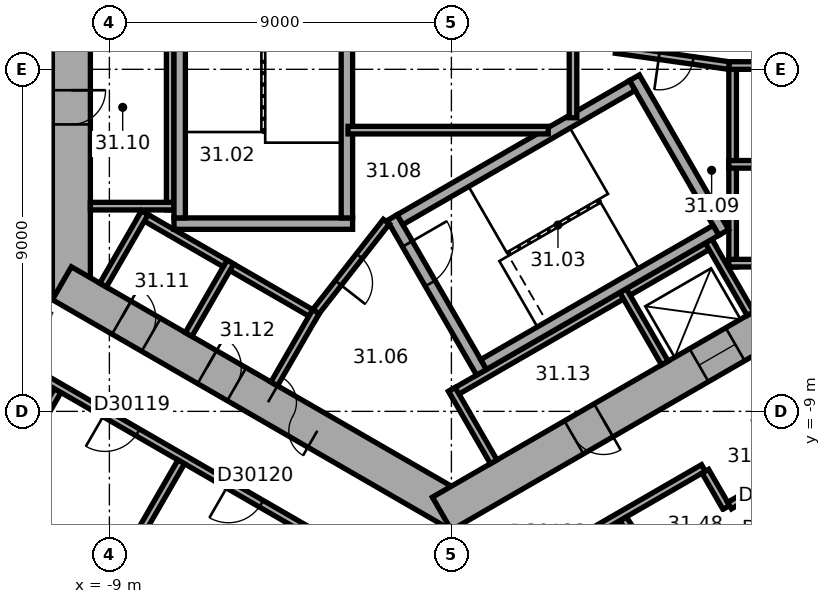
"""IFC4 building model, lengths in metres.
Left out: names, types, materials, properties, quantities, classifications, styles, units other than length and angle.
Written with IfcOpenShell. Run it as: python <this file> out.ifc"""

import sys

from ifc_helpers import new_model, si_unit, direction, frame, frame_2d, origin, place, context, subcontext, project, spatial, rectangle, extrude, element, fill, save


model = new_model("IFC4")
c1 = context("Model", 3, precision=1e-05, world=origin(), true_north=direction((0.0, 1.0)))
c2 = subcontext(c1, "Body", "Model", "MODEL_VIEW")
j1 = project(units=[si_unit("LENGTHUNIT", "METRE"), si_unit("PLANEANGLEUNIT", "RADIAN")], contexts=[c1])
p1 = place(None, origin())
s1 = spatial("IfcSite", under=j1, at=p1, CompositionType="ELEMENT")
p2 = place(p1, origin())
s2 = spatial("IfcBuilding", under=s1, at=p2, CompositionType="ELEMENT")
p3 = place(p2, frame((0.0, 0.0, 128.1)))
s3 = spatial("IfcBuildingStorey", under=s2, at=p3, CompositionType="ELEMENT", Elevation=128.1)
p4 = place(p3, frame((-10.0, 6.062, 0.0), z_axis=(0.0, 0.0, 1.0), x_axis=(0.0, -1.0, 0.0)))
e1 = element("IfcWall", 1, at=p4, inside=s3, PredefinedType="SHEAR", context=c2, shape_type="SweptSolid", body=[
    extrude(rectangle(XDim=12.125, YDim=1.0, at=frame_2d((6.062, 0.0))), origin(), (0.0, 0.0, 1.0), 3.7),
])
p5 = place(p4, frame((6.612, 0.0, 0.0)))
e2 = element("IfcOpeningElement", 2, at=p5, cuts=e1, PredefinedType="OPENING", context=c2, shape_type="SweptSolid", body=[
    extrude(rectangle(XDim=0.9, YDim=2.1, at=frame_2d((0.45, 1.05))), frame((0.0, 0.51, 0.0), z_axis=(0.0, -1.0, 0.0), x_axis=(1.0, 0.0, 0.0)), (0.0, 0.0, 1.0), 1.02),
])
p6 = place(p3, frame((-10.25, -5.629, 0.0), z_axis=(0.0, 0.0, 1.0), x_axis=(0.866022616891, -0.50000482701, 0.0)))
e3 = element("IfcWall", 3, at=p6, inside=s3, PredefinedType="SHEAR", context=c2, shape_type="SweptSolid", body=[
    extrude(rectangle(XDim=12.125, YDim=1.0, at=frame_2d((6.062, 0.0))), origin(), (0.0, 0.0, 1.0), 3.7),
])
p7 = place(p6, frame((6.262, 0.0, 0.0)))
e4 = element("IfcOpeningElement", 4, at=p7, cuts=e3, PredefinedType="OPENING", context=c2, shape_type="SweptSolid", body=[
    extrude(rectangle(XDim=1.5, YDim=2.1, at=frame_2d((0.75, 1.05))), frame((0.0, 0.51, 0.0), z_axis=(0.0, -1.0, 0.0), x_axis=(1.0, 0.0, 0.0)), (0.0, 0.0, 1.0), 1.02),
])
p8 = place(p6, frame((1.812, 0.0, 0.0)))
e5 = element("IfcOpeningElement", 5, at=p8, cuts=e3, PredefinedType="OPENING", context=c2, shape_type="SweptSolid", body=[
    extrude(rectangle(XDim=0.9, YDim=2.1, at=frame_2d((0.45, 1.05))), frame((0.0, 0.51, 0.0), z_axis=(0.0, -1.0, 0.0), x_axis=(1.0, 0.0, 0.0)), (0.0, 0.0, 1.0), 1.02),
])
p9 = place(p6, frame((4.412, 0.0, 0.0)))
e6 = element("IfcOpeningElement", 6, at=p9, cuts=e3, PredefinedType="OPENING", context=c2, shape_type="SweptSolid", body=[
    extrude(rectangle(XDim=0.9, YDim=2.1, at=frame_2d((0.45, 1.05))), frame((0.0, 0.51, 0.0), z_axis=(0.0, -1.0, 0.0), x_axis=(1.0, 0.0, 0.0)), (0.0, 0.0, 1.0), 1.02),
])
p10 = place(p3, frame((-0.25, -11.691, 0.0), z_axis=(0.0, 0.0, 1.0), x_axis=(0.866022616891, 0.50000482701, 0.0)))
e7 = element("IfcWall", 7, at=p10, inside=s3, PredefinedType="SHEAR", context=c2, shape_type="SweptSolid", body=[
    extrude(rectangle(XDim=12.125, YDim=1.0, at=frame_2d((6.062, 0.0))), origin(), (0.0, 0.0, 1.0), 3.7),
])
p11 = place(p10, frame((4.012, 0.0, 0.0)))
e8 = element("IfcOpeningElement", 8, at=p11, cuts=e7, PredefinedType="OPENING", context=c2, shape_type="SweptSolid", body=[
    extrude(rectangle(XDim=0.9, YDim=2.1, at=frame_2d((0.45, 1.05))), frame((0.0, 0.51, 0.0), z_axis=(0.0, -1.0, 0.0), x_axis=(1.0, 0.0, 0.0)), (0.0, 0.0, 1.0), 1.02),
])
p12 = place(p10, frame((7.812, 0.0, 0.0)))
e9 = element("IfcOpeningElement", 9, at=p12, cuts=e7, PredefinedType="OPENING", context=c2, shape_type="SweptSolid", body=[
    extrude(rectangle(XDim=1.1, YDim=2.1, at=frame_2d((0.55, 1.05))), frame((0.0, 0.51, 0.0), z_axis=(0.0, -1.0, 0.0), x_axis=(1.0, 0.0, 0.0)), (0.0, 0.0, 1.0), 1.02),
])
p13 = place(p3, frame((7.4, -5.2, 0.0), z_axis=(0.0, 0.0, 1.0), x_axis=(0.0, 1.0, 0.0)))
e10 = element("IfcWall", 10, at=p13, inside=s3, PredefinedType="PARTITIONING", context=c2, shape_type="SweptSolid", body=[
    extrude(rectangle(XDim=5.4, YDim=0.2, at=frame_2d((2.7, 0.0))), origin(), (0.0, 0.0, 1.0), 3.42),
])
for number, where, z_axis, x_axis in (
    (11, (7.3, -5.1, 0.0), (0.0, 0.0, 1.0), (1.0, 0.0, 0.0)),
    (12, (7.3, -2.5, 0.0), (0.0, 0.0, 1.0), (1.0, 0.0, 0.0)),
    (13, (7.3, 0.1, 0.0), (0.0, 0.0, 1.0), (1.0, 0.0, 0.0)),
):
    element("IfcWall", number, at=place(p3, frame(where, z_axis=z_axis, x_axis=x_axis)), inside=s3, PredefinedType="PARTITIONING", context=c2, shape_type="SweptSolid", body=[
        extrude(rectangle(XDim=2.2, YDim=0.2, at=frame_2d((1.1, 0.0))), origin(), (0.0, 0.0, 1.0), 3.42),
    ])
p14 = place(p3, frame((-7.4, 4.3, 0.0), z_axis=(0.0, 0.0, 1.0), x_axis=(0.0, -1.0, 0.0)))
e14 = element("IfcWall", 14, at=p14, inside=s3, PredefinedType="PARTITIONING", context=c2, shape_type="SweptSolid", body=[
    extrude(rectangle(XDim=8.0, YDim=0.2, at=frame_2d((4.0, 0.0))), origin(), (0.0, 0.0, 1.0), 3.42),
])
p15 = place(p3, frame((-7.3, -3.6, 0.0), z_axis=(0.0, 0.0, 1.0), x_axis=(-1.0, 0.0, 0.0)))
e15 = element("IfcWall", 15, at=p15, inside=s3, PredefinedType="PARTITIONING", context=c2, shape_type="SweptSolid", body=[
    extrude(rectangle(XDim=2.2, YDim=0.2, at=frame_2d((1.1, 0.0))), origin(), (0.0, 0.0, 1.0), 3.42),
])
p16 = place(p3, frame((-8.203, -3.809, 0.0), z_axis=(0.0, 0.0, 1.0), x_axis=(0.866028230842, -0.499995103361, 0.0)))
e16 = element("IfcWall", 16, at=p16, inside=s3, PredefinedType="PARTITIONING", context=c2, shape_type="SweptSolid", body=[
    extrude(rectangle(XDim=5.4, YDim=0.2, at=frame_2d((2.7, 0.0))), origin(), (0.0, 0.0, 1.0), 3.42),
])
for number, where, z_axis, x_axis in (
    (17, (-8.067, -3.772, 0.0), (0.0, 0.0, 1.0), (-0.5, -0.866, 0.0)),
    (18, (-5.815, -5.072, 0.0), (0.0, 0.0, 1.0), (-0.5, -0.866, 0.0)),
):
    element("IfcWall", number, at=place(p3, frame(where, z_axis=z_axis, x_axis=x_axis)), inside=s3, PredefinedType="PARTITIONING", context=c2, shape_type="SweptSolid", body=[
        extrude(rectangle(XDim=2.2, YDim=0.2, at=frame_2d((1.1, 0.0))), origin(), (0.0, 0.0, 1.0), 3.42),
    ])
p17 = place(p3, frame((-3.563, -6.372, 0.0), z_axis=(0.0, 0.0, 1.0), x_axis=(-0.499994660107, -0.866028486751, 0.0)))
e19 = element("IfcWall", 19, at=p17, inside=s3, PredefinedType="PARTITIONING", context=c2, shape_type="SweptSolid", body=[
    extrude(rectangle(XDim=2.2, YDim=0.2, at=frame_2d((1.1, 0.0))), origin(), (0.0, 0.0, 1.0), 3.42),
])
p18 = place(p3, frame((-0.024, -8.559, 0.0), z_axis=(0.0, 0.0, 1.0), x_axis=(0.866026010844, 0.49999894854, 0.0)))
e20 = element("IfcWall", 20, at=p18, inside=s3, PredefinedType="PARTITIONING", context=c2, shape_type="SweptSolid", body=[
    extrude(rectangle(XDim=8.0, YDim=0.2, at=frame_2d((4.0, 0.0))), origin(), (0.0, 0.0, 1.0), 3.42),
])
for number, where, z_axis, x_axis in (
    (21, (0.013, -8.422, 0.0), (0.0, 0.0, 1.0), (0.5, -0.866, 0.0)),
    (22, (4.516, -5.822, 0.0), (0.0, 0.0, 1.0), (0.5, -0.866, 0.0)),
    (23, (6.768, -4.522, 0.0), (0.0, 0.0, 1.0), (0.5, -0.866, 0.0)),
):
    element("IfcWall", number, at=place(p3, frame(where, z_axis=z_axis, x_axis=x_axis)), inside=s3, PredefinedType="PARTITIONING", context=c2, shape_type="SweptSolid", body=[
        extrude(rectangle(XDim=2.2, YDim=0.2, at=frame_2d((1.1, 0.0))), origin(), (0.0, 0.0, 1.0), 3.42),
    ])
p19 = place(p3, frame((-2.6, -4.06, 0.0), z_axis=(0.0, 0.0, 1.0), x_axis=(-1.0, 0.0, 0.0)))
e24 = element("IfcWall", 24, at=p19, inside=s3, PredefinedType="SHEAR", context=c2, shape_type="SweptSolid", body=[
    extrude(rectangle(XDim=4.7, YDim=0.3, at=frame_2d((2.35, 0.0))), origin(), (0.0, 0.0, 1.0), 3.42),
])
for number, where, z_axis, x_axis in (
    (25, (-2.75, 3.15, 0.0), (0.0, 0.0, 1.0), (0.0, -1.0, 0.0)),
    (26, (-7.15, 3.15, 0.0), (0.0, 0.0, 1.0), (0.0, -1.0, 0.0)),
):
    element("IfcWall", number, at=place(p3, frame(where, z_axis=z_axis, x_axis=x_axis)), inside=s3, PredefinedType="SHEAR", context=c2, shape_type="SweptSolid", body=[
        extrude(rectangle(XDim=7.06, YDim=0.3, at=frame_2d((3.53, 0.0))), origin(), (0.0, 0.0, 1.0), 3.42),
    ])
p20 = place(p3, frame((-1.558, -3.902, 0.0), z_axis=(0.0, 0.0, 1.0), x_axis=(0.499977259774, -0.866038532462, 0.0)))
e27 = element("IfcWall", 27, at=p20, inside=s3, PredefinedType="SHEAR", context=c2, shape_type="SweptSolid", body=[
    extrude(rectangle(XDim=4.7, YDim=0.3, at=frame_2d((2.35, 0.0))), origin(), (0.0, 0.0, 1.0), 3.42),
])
p21 = place(p20, frame((0.8, 0.0, 0.0)))
e28 = element("IfcOpeningElement", 28, at=p21, cuts=e27, PredefinedType="OPENING", context=c2, shape_type="SweptSolid", body=[
    extrude(rectangle(XDim=1.2, YDim=2.1, at=frame_2d((0.6, 1.05))), frame((0.0, 0.16, 0.0), z_axis=(0.0, -1.0, 0.0), x_axis=(1.0, 0.0, 0.0)), (0.0, 0.0, 1.0), 0.32),
])
p22 = place(p3, frame((4.816, -0.222, 0.0), z_axis=(0.0, 0.0, 1.0), x_axis=(0.499977259774, -0.866038532462, 0.0)))
e29 = element("IfcWall", 29, at=p22, inside=s3, PredefinedType="SHEAR", context=c2, shape_type="SweptSolid", body=[
    extrude(rectangle(XDim=4.7, YDim=0.3, at=frame_2d((2.35, 0.0))), origin(), (0.0, 0.0, 1.0), 3.42),
])
for number, where, z_axis, x_axis in (
    (30, (-1.353, -3.957, 0.0), (0.0, 0.0, 1.0), (0.866, 0.5, 0.0)),
    (31, (0.847, -7.767, 0.0), (0.0, 0.0, 1.0), (0.866, 0.5, 0.0)),
):
    element("IfcWall", number, at=place(p3, frame(where, z_axis=z_axis, x_axis=x_axis)), inside=s3, PredefinedType="SHEAR", context=c2, shape_type="SweptSolid", body=[
        extrude(rectangle(XDim=7.06, YDim=0.3, at=frame_2d((3.53, 0.0))), origin(), (0.0, 0.0, 1.0), 3.42),
    ])
p23 = place(p3, frame((4.327, 0.521, 0.0), z_axis=(0.0, 0.0, 1.0), x_axis=(0.990124376366, -0.14019172346, 0.0)))
e32 = element("IfcWall", 32, at=p23, inside=s3, PredefinedType="PARTITIONING", context=c2, shape_type="SweptSolid", body=[
    extrude(rectangle(XDim=3.002, YDim=0.2, at=frame_2d((1.501, 0.0))), origin(), (0.0, 0.0, 1.0), 3.42),
])
p24 = place(p23, frame((1.15, 0.0, 0.0)))
e33 = element("IfcOpeningElement", 33, at=p24, cuts=e32, PredefinedType="OPENING", context=c2, shape_type="SweptSolid", body=[
    extrude(rectangle(XDim=0.9, YDim=2.1, at=frame_2d((0.45, 1.05))), frame((0.0, 0.11, 0.0), z_axis=(0.0, -1.0, 0.0), x_axis=(1.0, 0.0, 0.0)), (0.0, 0.0, 1.0), 0.22),
])
p25 = place(p3, frame((-1.712, -4.008, 0.0), z_axis=(0.0, 0.0, 1.0), x_axis=(-0.616549420702, -0.787316208287, 0.0)))
e34 = element("IfcWall", 34, at=p25, inside=s3, PredefinedType="PARTITIONING", context=c2, shape_type="SweptSolid", body=[
    extrude(rectangle(XDim=3.002, YDim=0.2, at=frame_2d((1.501, 0.0))), origin(), (0.0, 0.0, 1.0), 3.42),
])
p26 = place(p25, frame((1.15, 0.0, 0.0)))
e35 = element("IfcOpeningElement", 35, at=p26, cuts=e34, PredefinedType="OPENING", context=c2, shape_type="SweptSolid", body=[
    extrude(rectangle(XDim=0.9, YDim=2.1, at=frame_2d((0.45, 1.05))), frame((0.0, 0.11, 0.0), z_axis=(0.0, -1.0, 0.0), x_axis=(1.0, 0.0, 0.0)), (0.0, 0.0, 1.0), 0.22),
])
p27 = place(p3, frame((-2.72, -1.6, 0.0), z_axis=(0.0, 0.0, 1.0), x_axis=(1.0, 0.0, 0.0)))
e36 = element("IfcWall", 36, at=p27, inside=s3, PredefinedType="PARTITIONING", context=c2, shape_type="SweptSolid", body=[
    extrude(rectangle(XDim=5.269, YDim=0.2, at=frame_2d((2.634, 0.0))), origin(), (0.0, 0.0, 1.0), 3.42),
])
p28 = place(p3, frame((3.2, -1.275, 0.0), z_axis=(0.0, 0.0, 1.0), x_axis=(0.0, 1.0, 0.0)))
e37 = element("IfcWall", 37, at=p28, inside=s3, PredefinedType="PARTITIONING", context=c2, shape_type="SweptSolid", body=[
    extrude(rectangle(XDim=2.549, YDim=0.2, at=frame_2d((1.275, 0.0))), origin(), (0.0, 0.0, 1.0), 3.42),
])
p29 = place(p3, frame((-14.486, -15.597, 0.0), z_axis=(0.0, 0.0, 1.0), x_axis=(0.499996545922, 0.866027397988, 0.0)))
e38 = element("IfcWall", 38, at=p29, inside=s3, PredefinedType="PARTITIONING", context=c2, shape_type="SweptSolid", body=[
    extrude(rectangle(XDim=8.25, YDim=0.2, at=frame_2d((4.125, 0.0))), origin(), (0.0, 0.0, 1.0), 3.42),
])
p30 = place(p3, frame((-11.415, -7.728, 0.0), z_axis=(0.0, 0.0, 1.0), x_axis=(0.866022749921, -0.500004596598, 0.0)))
e39 = element("IfcWall", 39, at=p30, inside=s3, PredefinedType="PARTITIONING", context=c2, shape_type="SweptSolid", body=[
    extrude(rectangle(XDim=12.084, YDim=0.2, at=frame_2d((6.042, 0.0))), origin(), (0.0, 0.0, 1.0), 3.42),
])
p31 = place(p30, frame((2.652, 0.0, 0.0)))
e40 = element("IfcOpeningElement", 40, at=p31, cuts=e39, PredefinedType="OPENING", context=c2, shape_type="SweptSolid", body=[
    extrude(rectangle(XDim=1.0, YDim=2.1, at=frame_2d((0.5, 1.05))), frame((0.0, 0.11, 0.0), z_axis=(0.0, -1.0, 0.0), x_axis=(1.0, 0.0, 0.0)), (0.0, 0.0, 1.0), 0.22),
])
p32 = place(p30, frame((6.406, 0.0, 0.0)))
e41 = element("IfcOpeningElement", 41, at=p32, cuts=e39, PredefinedType="OPENING", context=c2, shape_type="SweptSolid", body=[
    extrude(rectangle(XDim=1.0, YDim=2.1, at=frame_2d((0.5, 1.05))), frame((0.0, 0.11, 0.0), z_axis=(0.0, -1.0, 0.0), x_axis=(1.0, 0.0, 0.0)), (0.0, 0.0, 1.0), 0.22),
])
p33 = place(p30, frame((9.934, 0.0, 0.0)))
e42 = element("IfcOpeningElement", 42, at=p33, cuts=e39, PredefinedType="OPENING", context=c2, shape_type="SweptSolid", body=[
    extrude(rectangle(XDim=1.0, YDim=2.1, at=frame_2d((0.5, 1.05))), frame((0.0, 0.11, 0.0), z_axis=(0.0, -1.0, 0.0), x_axis=(1.0, 0.0, 0.0)), (0.0, 0.0, 1.0), 0.22),
])
p34 = place(p3, frame((-11.235, -17.474, 0.0), z_axis=(0.0, 0.0, 1.0), x_axis=(0.499996545922, 0.866027397988, 0.0)))
e43 = element("IfcWall", 43, at=p34, inside=s3, PredefinedType="PARTITIONING", context=c2, shape_type="SweptSolid", body=[
    extrude(rectangle(XDim=8.25, YDim=0.2, at=frame_2d((4.125, 0.0))), origin(), (0.0, 0.0, 1.0), 2.87),
])
p35 = place(p3, frame((1.204, -13.623, 0.0), z_axis=(0.0, 0.0, 1.0), x_axis=(0.866031867142, 0.49998880497, 0.0)))
e44 = element("IfcWall", 44, at=p35, inside=s3, PredefinedType="PARTITIONING", context=c2, shape_type="SweptSolid", body=[
    extrude(rectangle(XDim=6.268, YDim=0.2, at=frame_2d((3.134, 0.0))), origin(), (0.0, 0.0, 1.0), 3.42),
])
p36 = place(p35, frame((1.381, 0.0, 0.0)))
e45 = element("IfcOpeningElement", 45, at=p36, cuts=e44, PredefinedType="OPENING", context=c2, shape_type="SweptSolid", body=[
    extrude(rectangle(XDim=1.0, YDim=2.1, at=frame_2d((0.5, 1.05))), frame((0.0, 0.11, 0.0), z_axis=(0.0, -1.0, 0.0), x_axis=(1.0, 0.0, 0.0)), (0.0, 0.0, 1.0), 0.22),
])
p37 = place(p3, frame((6.152, -14.116, 0.0), z_axis=(0.0, 0.0, 1.0), x_axis=(0.866026788224, 0.499997602072, 0.0)))
e46 = element("IfcWall", 46, at=p37, inside=s3, PredefinedType="PARTITIONING", context=c2, shape_type="SweptSolid", body=[
    extrude(rectangle(XDim=7.322, YDim=0.12, at=frame_2d((3.661, 0.0))), origin(), (0.0, 0.0, 1.0), 3.42),
])
p38 = place(p37, frame((0.55, 0.0, 0.0)))
e47 = element("IfcOpeningElement", 47, at=p38, cuts=e46, PredefinedType="OPENING", context=c2, shape_type="SweptSolid", body=[
    extrude(rectangle(XDim=1.0, YDim=2.1, at=frame_2d((0.5, 1.05))), frame((0.0, 0.07, 0.0), z_axis=(0.0, -1.0, 0.0), x_axis=(1.0, 0.0, 0.0)), (0.0, 0.0, 1.0), 0.14),
])
p39 = place(p37, frame((2.736, 0.0, 0.0)))
e48 = element("IfcOpeningElement", 48, at=p39, cuts=e46, PredefinedType="OPENING", context=c2, shape_type="SweptSolid", body=[
    extrude(rectangle(XDim=0.9, YDim=2.1, at=frame_2d((0.45, 1.05))), frame((0.0, 0.07, 0.0), z_axis=(0.0, -1.0, 0.0), x_axis=(1.0, 0.0, 0.0)), (0.0, 0.0, 1.0), 0.14),
])
p40 = place(p37, frame((5.347, 0.0, 0.0)))
e49 = element("IfcOpeningElement", 49, at=p40, cuts=e46, PredefinedType="OPENING", context=c2, shape_type="SweptSolid", body=[
    extrude(rectangle(XDim=0.9, YDim=2.1, at=frame_2d((0.45, 1.05))), frame((0.0, 0.07, 0.0), z_axis=(0.0, -1.0, 0.0), x_axis=(1.0, 0.0, 0.0)), (0.0, 0.0, 1.0), 0.14),
])
p41 = place(p3, frame((6.682, -10.576, 0.0), z_axis=(0.0, 0.0, 1.0), x_axis=(0.499978356969, -0.866037899034, 0.0)))
e50 = element("IfcWall", 50, at=p41, inside=s3, PredefinedType="PARTITIONING", context=c2, shape_type="SweptSolid", body=[
    extrude(rectangle(XDim=1.101, YDim=0.2, at=frame_2d((0.551, 0.0))), origin(), (0.0, 0.0, 1.0), 3.42),
])
p42 = place(p3, frame((7.319, -11.479, 0.0), z_axis=(0.0, 0.0, 1.0), x_axis=(0.866038154057, 0.49997791523, 0.0)))
e51 = element("IfcWall", 51, at=p42, inside=s3, PredefinedType="PARTITIONING", context=c2, shape_type="SweptSolid", body=[
    extrude(rectangle(XDim=3.502, YDim=0.2, at=frame_2d((1.751, 0.0))), origin(), (0.0, 0.0, 1.0), 3.42),
])
p43 = place(p42, frame((1.251, 0.0, 0.0)))
e52 = element("IfcOpeningElement", 52, at=p43, cuts=e51, PredefinedType="OPENING", context=c2, shape_type="SweptSolid", body=[
    extrude(rectangle(XDim=1.0, YDim=2.1, at=frame_2d((0.5, 1.05))), frame((0.0, 0.11, 0.0), z_axis=(0.0, -1.0, 0.0), x_axis=(1.0, 0.0, 0.0)), (0.0, 0.0, 1.0), 0.22),
])
p44 = place(p3, frame((9.15, -18.827, 0.0), z_axis=(0.0, 0.0, 1.0), x_axis=(-0.551942527453, 0.833882153777, 0.0)))
e53 = element("IfcWall", 53, at=p44, inside=s3, PredefinedType="PARTITIONING", context=c2, shape_type="SweptSolid", body=[
    extrude(rectangle(XDim=8.386, YDim=0.2, at=frame_2d((4.193, 0.0))), origin(), (0.0, 0.0, 1.0), 2.87),
])
p45 = place(p7, origin())
e54 = element("IfcDoor", 54, at=p45, inside=s3, OperationType="DOUBLE_DOOR_SINGLE_SWING", PredefinedType="DOOR", context=c2, shape_type="SweptSolid", body=[
    extrude(rectangle(XDim=1.5, YDim=2.1, at=frame_2d((0.75, 1.05))), frame((0.0, 0.025, 0.0), z_axis=(0.0, -1.0, 0.0), x_axis=(1.0, 0.0, 0.0)), (0.0, 0.0, 1.0), 0.05),
])
fill(e4, e54)
p46 = place(p21, origin())
e55 = element("IfcDoor", 55, at=p46, inside=s3, OperationType="SINGLE_SWING_RIGHT", PredefinedType="DOOR", context=c2, shape_type="SweptSolid", body=[
    extrude(rectangle(XDim=1.2, YDim=2.1, at=frame_2d((0.6, 1.05))), frame((0.0, 0.025, 0.0), z_axis=(0.0, -1.0, 0.0), x_axis=(1.0, 0.0, 0.0)), (0.0, 0.0, 1.0), 0.05),
])
fill(e28, e55)
p47 = place(p24, origin())
e56 = element("IfcDoor", 56, at=p47, inside=s3, OperationType="SINGLE_SWING_LEFT", PredefinedType="DOOR", context=c2, shape_type="SweptSolid", body=[
    extrude(rectangle(XDim=0.9, YDim=2.1, at=frame_2d((0.45, 1.05))), frame((0.0, 0.025, 0.0), z_axis=(0.0, -1.0, 0.0), x_axis=(1.0, 0.0, 0.0)), (0.0, 0.0, 1.0), 0.05),
])
fill(e33, e56)
p48 = place(p26, origin())
e57 = element("IfcDoor", 57, at=p48, inside=s3, OperationType="SINGLE_SWING_LEFT", PredefinedType="DOOR", context=c2, shape_type="SweptSolid", body=[
    extrude(rectangle(XDim=0.9, YDim=2.1, at=frame_2d((0.45, 1.05))), frame((0.0, 0.025, 0.0), z_axis=(0.0, -1.0, 0.0), x_axis=(1.0, 0.0, 0.0)), (0.0, 0.0, 1.0), 0.05),
])
fill(e35, e57)
p49 = place(p5, origin())
e58 = element("IfcDoor", 58, at=p49, inside=s3, OperationType="SINGLE_SWING_LEFT", PredefinedType="DOOR", context=c2, shape_type="SweptSolid", body=[
    extrude(rectangle(XDim=0.9, YDim=2.1, at=frame_2d((0.45, 1.05))), frame((0.0, 0.025, 0.0), z_axis=(0.0, -1.0, 0.0), x_axis=(1.0, 0.0, 0.0)), (0.0, 0.0, 1.0), 0.05),
])
fill(e2, e58)
p50 = place(p8, origin())
e59 = element("IfcDoor", 59, at=p50, inside=s3, OperationType="SINGLE_SWING_LEFT", PredefinedType="DOOR", context=c2, shape_type="SweptSolid", body=[
    extrude(rectangle(XDim=0.9, YDim=2.1, at=frame_2d((0.45, 1.05))), frame((0.0, 0.025, 0.0), z_axis=(0.0, -1.0, 0.0), x_axis=(1.0, 0.0, 0.0)), (0.0, 0.0, 1.0), 0.05),
])
fill(e5, e59)
p51 = place(p9, origin())
e60 = element("IfcDoor", 60, at=p51, inside=s3, OperationType="SINGLE_SWING_LEFT", PredefinedType="DOOR", context=c2, shape_type="SweptSolid", body=[
    extrude(rectangle(XDim=0.9, YDim=2.1, at=frame_2d((0.45, 1.05))), frame((0.0, 0.025, 0.0), z_axis=(0.0, -1.0, 0.0), x_axis=(1.0, 0.0, 0.0)), (0.0, 0.0, 1.0), 0.05),
])
fill(e6, e60)
p52 = place(p11, origin())
e61 = element("IfcDoor", 61, at=p52, inside=s3, OperationType="SINGLE_SWING_LEFT", PredefinedType="DOOR", context=c2, shape_type="SweptSolid", body=[
    extrude(rectangle(XDim=0.9, YDim=2.1, at=frame_2d((0.45, 1.05))), frame((0.0, 0.025, 0.0), z_axis=(0.0, -1.0, 0.0), x_axis=(1.0, 0.0, 0.0)), (0.0, 0.0, 1.0), 0.05),
])
fill(e8, e61)
p53 = place(p12, origin())
e62 = element("IfcDoor", 62, at=p53, inside=s3, OperationType="DOUBLE_DOOR_SLIDING", PredefinedType="DOOR", context=c2, shape_type="SweptSolid", body=[
    extrude(rectangle(XDim=1.1, YDim=2.1, at=frame_2d((0.55, 1.05))), frame((0.0, 0.025, 0.0), z_axis=(0.0, -1.0, 0.0), x_axis=(1.0, 0.0, 0.0)), (0.0, 0.0, 1.0), 0.05),
])
fill(e9, e62)
p54 = place(p31, origin())
e63 = element("IfcDoor", 63, at=p54, inside=s3, OperationType="SINGLE_SWING_LEFT", PredefinedType="DOOR", context=c2, shape_type="SweptSolid", body=[
    extrude(rectangle(XDim=1.0, YDim=2.1, at=frame_2d((0.5, 1.05))), frame((0.0, 0.025, 0.0), z_axis=(0.0, -1.0, 0.0), x_axis=(1.0, 0.0, 0.0)), (0.0, 0.0, 1.0), 0.05),
])
fill(e40, e63)
p55 = place(p32, origin())
e64 = element("IfcDoor", 64, at=p55, inside=s3, OperationType="SINGLE_SWING_LEFT", PredefinedType="DOOR", context=c2, shape_type="SweptSolid", body=[
    extrude(rectangle(XDim=1.0, YDim=2.1, at=frame_2d((0.5, 1.05))), frame((0.0, 0.025, 0.0), z_axis=(0.0, -1.0, 0.0), x_axis=(1.0, 0.0, 0.0)), (0.0, 0.0, 1.0), 0.05),
])
fill(e41, e64)
save(model, sys.argv[1])
